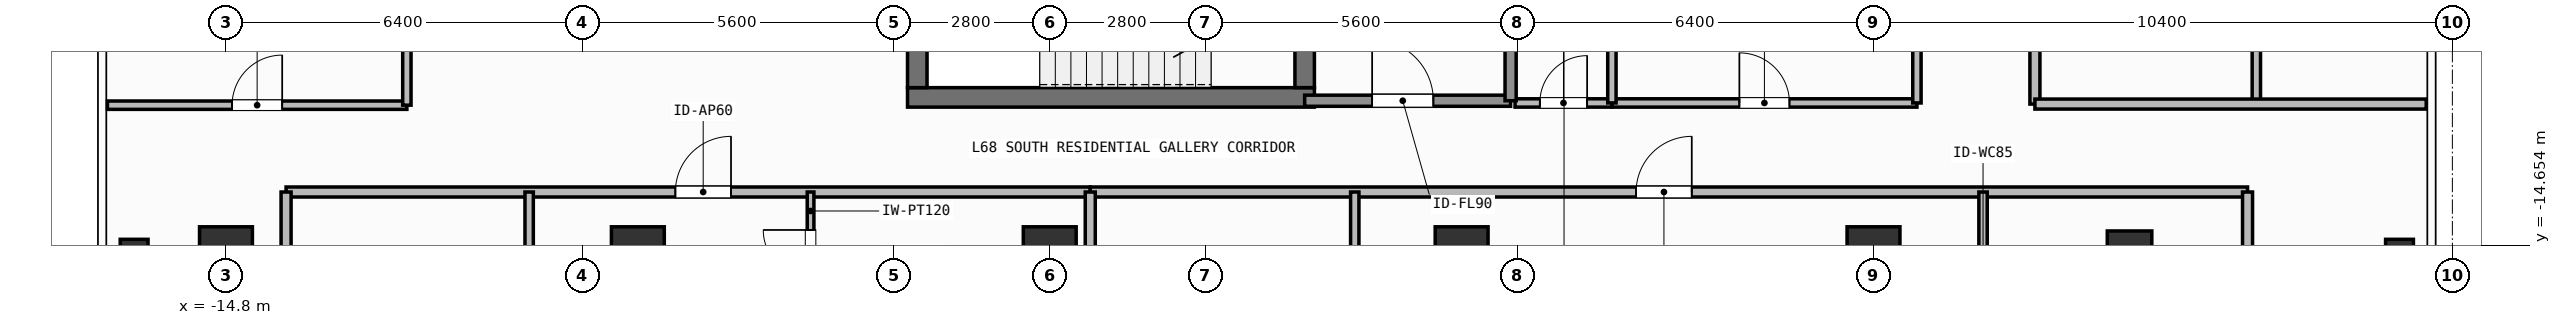
"""IFC4 building model, lengths in metres.
Left out: names, types, materials, properties, quantities, classifications, styles, units other than length and angle.
Written with IfcOpenShell. Run it as: python <this file> out.ifc"""

import sys

from ifc_helpers import new_model, si_unit, direction, frame, frame_2d, origin, origin_2d, place, context, subcontext, project, spatial, rectangle, hollow_rectangle, extrude, element, fill, save


model = new_model("IFC4")
c1 = context("Model", 3, precision=1e-05, world=origin(), true_north=direction((0.0, 1.0)))
c2 = subcontext(c1, "Body", "Model", "MODEL_VIEW")
j1 = project(units=[si_unit("LENGTHUNIT", "METRE"), si_unit("PLANEANGLEUNIT", "RADIAN")], contexts=[c1])
p1 = place(None, origin())
s1 = spatial("IfcSite", under=j1, at=p1, CompositionType="ELEMENT")
p2 = place(p1, origin())
s2 = spatial("IfcBuilding", under=s1, at=p2, CompositionType="ELEMENT")
p3 = place(p2, frame((0.0, 0.0, 278.1)))
s3 = spatial("IfcBuildingStorey", under=s2, at=p3, CompositionType="ELEMENT", Elevation=278.1)
p4 = place(p3, frame((-2.555, -12.0, 0.0), z_axis=(0.0, 0.0, 1.0), x_axis=(1.0, 0.0, 0.0)))
e1 = element("IfcWall", 1, at=p4, inside=s3, PredefinedType="SHEAR", context=c2, shape_type="SweptSolid", body=[
    extrude(rectangle(XDim=7.31, YDim=0.35, at=frame_2d((3.655, 0.0))), origin(), (0.0, 0.0, 1.0), 3.9),
])
p5 = place(p3, frame((-2.38, -11.825, 0.0), z_axis=(0.0, 0.0, 1.0), x_axis=(0.0, 1.0, 0.0)))
e2 = element("IfcWall", 2, at=p5, inside=s3, PredefinedType="SHEAR", context=c2, shape_type="SweptSolid", body=[
    extrude(rectangle(XDim=2.925, YDim=0.35, at=frame_2d((1.462, 0.0))), origin(), (0.0, 0.0, 1.0), 3.9),
])
p6 = place(p3, frame((4.58, -8.9, 0.0), z_axis=(0.0, 0.0, 1.0), x_axis=(0.0, -1.0, 0.0)))
e3 = element("IfcWall", 3, at=p6, inside=s3, PredefinedType="SHEAR", context=c2, shape_type="SweptSolid", body=[
    extrude(rectangle(XDim=2.925, YDim=0.35, at=frame_2d((1.462, 0.0))), origin(), (0.0, 0.0, 1.0), 3.9),
])
p7 = place(p6, frame((0.913, 0.0, 0.0)))
e4 = element("IfcOpeningElement", 4, at=p7, cuts=e3, PredefinedType="OPENING", context=c2, shape_type="SweptSolid", body=[
    extrude(rectangle(XDim=1.1, YDim=2.15, at=frame_2d((0.55, 1.075))), frame((0.0, 0.185, 0.0), z_axis=(0.0, -1.0, 0.0), x_axis=(1.0, 0.0, 0.0)), (0.0, 0.0, 1.0), 0.37),
])
for number, where, z_axis, x_axis in (
    (5, (-14.8, -14.8, 0.0), (0.0, 0.0, 1.0), (1.0, 0.0, 0.0)),
    (6, (-7.4, -14.8, 0.0), (0.0, 0.0, 1.0), (1.0, 0.0, 0.0)),
    (7, (0.0, -14.8, 0.0), (0.0, 0.0, 1.0), (1.0, 0.0, 0.0)),
    (8, (7.4, -14.8, 0.0), (0.0, 0.0, 1.0), (1.0, 0.0, 0.0)),
    (9, (14.8, -14.8, 0.0), (0.0, 0.0, 1.0), (1.0, 0.0, 0.0)),
):
    element("IfcColumn", number, at=place(p3, frame(where, z_axis=z_axis, x_axis=x_axis)), inside=s3, PredefinedType="COLUMN", context=c2, shape_type="SweptSolid", body=[
        extrude(rectangle(XDim=0.95, YDim=0.95, at=origin_2d()), origin(), (0.0, 0.0, 1.0), 3.9),
    ])
p8 = place(p3, frame((19.4, -14.8, 0.0), z_axis=(0.0, 0.0, 1.0), x_axis=(1.0, 0.0, 0.0)))
e10 = element("IfcColumn", 10, at=p8, inside=s3, PredefinedType="COLUMN", context=c2, shape_type="SweptSolid", body=[
    extrude(hollow_rectangle(XDim=0.8, YDim=0.8, WallThickness=0.036, at=origin_2d()), origin(), (0.0, 0.0, 1.0), 3.9),
])
for number, where, z_axis, x_axis in (
    (11, (-16.45, -14.8, 0.0), (0.0, 0.0, 1.0), (1.0, 0.0, 0.0)),
    (12, (24.25, -14.8, 0.0), (0.0, 0.0, 1.0), (1.0, 0.0, 0.0)),
):
    element("IfcColumn", number, at=place(p3, frame(where, z_axis=z_axis, x_axis=x_axis)), inside=s3, PredefinedType="COLUMN", context=c2, shape_type="SweptSolid", body=[
        extrude(hollow_rectangle(XDim=0.5, YDim=0.5, WallThickness=0.025, at=origin_2d()), origin(), (0.0, 0.0, 1.0), 3.9),
    ])
p9 = place(p3, frame((4.58, -12.06, 0.0), z_axis=(0.0, 0.0, 1.0), x_axis=(1.0, 0.0, 0.0)))
e13 = element("IfcWall", 13, at=p9, inside=s3, PredefinedType="SOLIDWALL", context=c2, shape_type="SweptSolid", body=[
    extrude(rectangle(XDim=3.7, YDim=0.2, at=frame_2d((1.85, 0.0))), origin(), (0.0, 0.0, 1.0), 3.68),
])
p10 = place(p9, frame((1.212, 0.0, 0.0)))
e14 = element("IfcOpeningElement", 14, at=p10, cuts=e13, PredefinedType="OPENING", context=c2, shape_type="SweptSolid", body=[
    extrude(rectangle(XDim=1.1, YDim=2.15, at=frame_2d((0.55, 1.075))), frame((0.0, 0.11, 0.0), z_axis=(0.0, -1.0, 0.0), x_axis=(1.0, 0.0, 0.0)), (0.0, 0.0, 1.0), 0.22),
])
p11 = place(p3, frame((8.36, -12.1, 0.0), z_axis=(0.0, 0.0, 1.0), x_axis=(1.0, 0.0, 0.0)))
e15 = element("IfcWall", 15, at=p11, inside=s3, PredefinedType="PARTITIONING", context=c2, shape_type="SweptSolid", body=[
    extrude(rectangle(XDim=1.74, YDim=0.15, at=frame_2d((0.87, 0.0))), origin(), (0.0, 0.0, 1.0), 3.68),
])
p12 = place(p11, frame((0.445, 0.0, 0.0)))
e16 = element("IfcOpeningElement", 16, at=p12, cuts=e15, PredefinedType="OPENING", context=c2, shape_type="SweptSolid", body=[
    extrude(rectangle(XDim=0.85, YDim=2.1, at=frame_2d((0.425, 1.05))), frame((0.0, 0.085, 0.0), z_axis=(0.0, -1.0, 0.0), x_axis=(1.0, 0.0, 0.0)), (0.0, 0.0, 1.0), 0.17),
])
p13 = place(p3, frame((10.1, -12.1, 0.0), z_axis=(0.0, 0.0, 1.0), x_axis=(1.0, 0.0, 0.0)))
e17 = element("IfcWall", 17, at=p13, inside=s3, PredefinedType="PARTITIONING", context=c2, shape_type="SweptSolid", body=[
    extrude(rectangle(XDim=5.48, YDim=0.15, at=frame_2d((2.74, 0.0))), origin(), (0.0, 0.0, 1.0), 3.68),
])
p14 = place(p13, frame((2.29, 0.0, 0.0)))
e18 = element("IfcOpeningElement", 18, at=p14, cuts=e17, PredefinedType="OPENING", context=c2, shape_type="SweptSolid", body=[
    extrude(rectangle(XDim=0.9, YDim=2.1, at=frame_2d((0.45, 1.05))), frame((0.0, 0.085, 0.0), z_axis=(0.0, -1.0, 0.0), x_axis=(1.0, 0.0, 0.0)), (0.0, 0.0, 1.0), 0.17),
])
p15 = place(p3, frame((-13.72, -13.7, 0.0), z_axis=(0.0, 0.0, 1.0), x_axis=(1.0, 0.0, 0.0)))
e19 = element("IfcWall", 19, at=p15, inside=s3, PredefinedType="PARTITIONING", context=c2, shape_type="SweptSolid", body=[
    extrude(rectangle(XDim=14.448, YDim=0.18, at=frame_2d((7.224, 0.0))), origin(), (0.0, 0.0, 1.0), 3.68),
])
p16 = place(p15, frame((6.994, 0.0, 0.0)))
e20 = element("IfcOpeningElement", 20, at=p16, cuts=e19, PredefinedType="OPENING", context=c2, shape_type="SweptSolid", body=[
    extrude(rectangle(XDim=1.0, YDim=2.2, at=frame_2d((0.5, 1.1))), frame((0.0, 0.1, 0.0), z_axis=(0.0, -1.0, 0.0), x_axis=(1.0, 0.0, 0.0)), (0.0, 0.0, 1.0), 0.2),
])
p17 = place(p3, frame((-9.353, -17.343, 0.0), z_axis=(0.0, 0.0, 1.0), x_axis=(0.0, 1.0, 0.0)))
e21 = element("IfcWall", 21, at=p17, inside=s3, PredefinedType="PARTITIONING", context=c2, shape_type="SweptSolid", body=[
    extrude(rectangle(XDim=3.643, YDim=0.15, at=frame_2d((1.822, 0.0))), origin(), (0.0, 0.0, 1.0), 3.68),
])
p18 = place(p17, frame((1.396, 0.0, 0.0)))
e22 = element("IfcOpeningElement", 22, at=p18, cuts=e21, PredefinedType="OPENING", context=c2, shape_type="SweptSolid", body=[
    extrude(rectangle(XDim=0.85, YDim=2.1, at=frame_2d((0.425, 1.05))), frame((0.0, 0.085, 0.0), z_axis=(0.0, -1.0, 0.0), x_axis=(1.0, 0.0, 0.0)), (0.0, 0.0, 1.0), 0.17),
])
p19 = place(p3, frame((-4.297, -15.74, 0.0), z_axis=(0.0, 0.0, 1.0), x_axis=(0.0, 1.0, 0.0)))
e23 = element("IfcWall", 23, at=p19, inside=s3, PredefinedType="PARTITIONING", context=c2, shape_type="SweptSolid", body=[
    extrude(rectangle(XDim=2.04, YDim=0.12, at=frame_2d((1.02, 0.0))), origin(), (0.0, 0.0, 1.0), 3.68),
])
p20 = place(p19, frame((0.508, 0.0, 0.0)))
e24 = element("IfcOpeningElement", 24, at=p20, cuts=e23, PredefinedType="OPENING", context=c2, shape_type="SweptSolid", body=[
    extrude(rectangle(XDim=0.85, YDim=2.1, at=frame_2d((0.425, 1.05))), frame((0.0, 0.07, 0.0), z_axis=(0.0, -1.0, 0.0), x_axis=(1.0, 0.0, 0.0)), (0.0, 0.0, 1.0), 0.14),
])
p21 = place(p3, frame((0.728, -13.7, 0.0), z_axis=(0.0, 0.0, 1.0), x_axis=(1.0, 0.0, 0.0)))
e25 = element("IfcWall", 25, at=p21, inside=s3, PredefinedType="PARTITIONING", context=c2, shape_type="SweptSolid", body=[
    extrude(rectangle(XDim=20.792, YDim=0.18, at=frame_2d((10.396, 0.0))), origin(), (0.0, 0.0, 1.0), 3.68),
])
p22 = place(p21, frame((9.807, 0.0, 0.0)))
e26 = element("IfcOpeningElement", 26, at=p22, cuts=e25, PredefinedType="OPENING", context=c2, shape_type="SweptSolid", body=[
    extrude(rectangle(XDim=1.0, YDim=2.2, at=frame_2d((0.5, 1.1))), frame((0.0, 0.1, 0.0), z_axis=(0.0, -1.0, 0.0), x_axis=(1.0, 0.0, 0.0)), (0.0, 0.0, 1.0), 0.2),
])
p23 = place(p3, frame((5.48, -17.045, 0.0), z_axis=(0.0, 0.0, 1.0), x_axis=(0.0, 1.0, 0.0)))
e27 = element("IfcWall", 27, at=p23, inside=s3, PredefinedType="PARTITIONING", context=c2, shape_type="SweptSolid", body=[
    extrude(rectangle(XDim=3.345, YDim=0.15, at=frame_2d((1.672, 0.0))), origin(), (0.0, 0.0, 1.0), 3.68),
])
p24 = place(p23, frame((1.164, 0.0, 0.0)))
e28 = element("IfcOpeningElement", 28, at=p24, cuts=e27, PredefinedType="OPENING", context=c2, shape_type="SweptSolid", body=[
    extrude(rectangle(XDim=0.85, YDim=2.1, at=frame_2d((0.425, 1.05))), frame((0.0, 0.085, 0.0), z_axis=(0.0, -1.0, 0.0), x_axis=(1.0, 0.0, 0.0)), (0.0, 0.0, 1.0), 0.17),
])
p25 = place(p3, frame((16.768, -17.045, 0.0), z_axis=(0.0, 0.0, 1.0), x_axis=(0.0, 1.0, 0.0)))
e29 = element("IfcWall", 29, at=p25, inside=s3, PredefinedType="PARTITIONING", context=c2, shape_type="SweptSolid", body=[
    extrude(rectangle(XDim=3.345, YDim=0.15, at=frame_2d((1.672, 0.0))), origin(), (0.0, 0.0, 1.0), 3.68),
])
p26 = place(p25, frame((1.164, 0.0, 0.0)))
e30 = element("IfcOpeningElement", 30, at=p26, cuts=e29, PredefinedType="OPENING", context=c2, shape_type="SweptSolid", body=[
    extrude(rectangle(XDim=0.85, YDim=2.1, at=frame_2d((0.425, 1.05))), frame((0.0, 0.085, 0.0), z_axis=(0.0, -1.0, 0.0), x_axis=(1.0, 0.0, 0.0)), (0.0, 0.0, 1.0), 0.17),
])
p27 = place(p3, frame((-16.93, -12.14, 0.0), z_axis=(0.0, 0.0, 1.0), x_axis=(1.0, 0.0, 0.0)))
e31 = element("IfcWall", 31, at=p27, inside=s3, PredefinedType="PARTITIONING", context=c2, shape_type="SweptSolid", body=[
    extrude(rectangle(XDim=5.38, YDim=0.15, at=frame_2d((2.69, 0.0))), origin(), (0.0, 0.0, 1.0), 3.68),
])
p28 = place(p27, frame((2.24, 0.0, 0.0)))
e32 = element("IfcOpeningElement", 32, at=p28, cuts=e31, PredefinedType="OPENING", context=c2, shape_type="SweptSolid", body=[
    extrude(rectangle(XDim=0.9, YDim=2.1, at=frame_2d((0.45, 1.05))), frame((0.0, 0.085, 0.0), z_axis=(0.0, -1.0, 0.0), x_axis=(1.0, 0.0, 0.0)), (0.0, 0.0, 1.0), 0.17),
])
p29 = place(p3, frame((17.7, -12.12, 0.0), z_axis=(0.0, 0.0, 1.0), x_axis=(0.0, 1.0, 0.0)))
e33 = element("IfcWall", 33, at=p29, inside=s3, PredefinedType="PARTITIONING", context=c2, shape_type="SweptSolid", body=[
    extrude(rectangle(XDim=24.24, YDim=0.18, at=frame_2d((12.12, 0.0))), origin(), (0.0, 0.0, 1.0), 3.68),
])
p30 = place(p29, frame((11.62, 0.0, 0.0)))
e34 = element("IfcOpeningElement", 34, at=p30, cuts=e33, PredefinedType="OPENING", context=c2, shape_type="SweptSolid", body=[
    extrude(rectangle(XDim=1.0, YDim=2.2, at=frame_2d((0.5, 1.1))), frame((0.0, 0.1, 0.0), z_axis=(0.0, -1.0, 0.0), x_axis=(1.0, 0.0, 0.0)), (0.0, 0.0, 1.0), 0.2),
])
p31 = place(p3, frame((8.28, -12.06, 0.0), z_axis=(0.0, 0.0, 1.0), x_axis=(0.0, 1.0, 0.0)))
e35 = element("IfcWall", 35, at=p31, inside=s3, PredefinedType="SOLIDWALL", context=c2, shape_type="SweptSolid", body=[
    extrude(rectangle(XDim=3.335, YDim=0.2, at=frame_2d((1.667, 0.0))), origin(), (0.0, 0.0, 1.0), 3.68),
])
p32 = place(p3, frame((10.1, -12.1, 0.0), z_axis=(0.0, 0.0, 1.0), x_axis=(0.0, 1.0, 0.0)))
e36 = element("IfcWall", 36, at=p32, inside=s3, PredefinedType="PARTITIONING", context=c2, shape_type="SweptSolid", body=[
    extrude(rectangle(XDim=2.35, YDim=0.15, at=frame_2d((1.175, 0.0))), origin(), (0.0, 0.0, 1.0), 3.68),
])
p33 = place(p3, frame((15.58, -12.1, 0.0), z_axis=(0.0, 0.0, 1.0), x_axis=(0.0, 1.0, 0.0)))
e37 = element("IfcWall", 37, at=p33, inside=s3, PredefinedType="PARTITIONING", context=c2, shape_type="SweptSolid", body=[
    extrude(rectangle(XDim=6.25, YDim=0.15, at=frame_2d((3.125, 0.0))), origin(), (0.0, 0.0, 1.0), 3.68),
])
for number, where, z_axis, x_axis in (
    (38, (-13.72, -19.51, 0.0), (0.0, 0.0, 1.0), (0.0, 1.0, 0.0)),
    (39, (21.52, -19.51, 0.0), (0.0, 0.0, 1.0), (0.0, 1.0, 0.0)),
):
    element("IfcWall", number, at=place(p3, frame(where, z_axis=z_axis, x_axis=x_axis)), inside=s3, PredefinedType="PARTITIONING", context=c2, shape_type="SweptSolid", body=[
        extrude(rectangle(XDim=5.81, YDim=0.18, at=frame_2d((2.905, 0.0))), origin(), (0.0, 0.0, 1.0), 3.68),
    ])
p34 = place(p3, frame((0.728, -20.63, 0.0), z_axis=(0.0, 0.0, 1.0), x_axis=(0.0, 1.0, 0.0)))
e40 = element("IfcWall", 40, at=p34, inside=s3, PredefinedType="PARTITIONING", context=c2, shape_type="SweptSolid", body=[
    extrude(rectangle(XDim=6.93, YDim=0.18, at=frame_2d((3.465, 0.0))), origin(), (0.0, 0.0, 1.0), 3.68),
])
p35 = place(p3, frame((-11.55, -12.14, 0.0), z_axis=(0.0, 0.0, 1.0), x_axis=(0.0, 1.0, 0.0)))
e41 = element("IfcWall", 41, at=p35, inside=s3, PredefinedType="PARTITIONING", context=c2, shape_type="SweptSolid", body=[
    extrude(rectangle(XDim=13.94, YDim=0.15, at=frame_2d((6.97, 0.0))), origin(), (0.0, 0.0, 1.0), 3.68),
])
p36 = place(p3, frame((21.678, -12.12, 0.0), z_axis=(0.0, 0.0, 1.0), x_axis=(0.0, 1.0, 0.0)))
e42 = element("IfcWall", 42, at=p36, inside=s3, PredefinedType="PARTITIONING", context=c2, shape_type="SweptSolid", body=[
    extrude(rectangle(XDim=6.689, YDim=0.15, at=frame_2d((3.345, 0.0))), origin(), (0.0, 0.0, 1.0), 3.68),
])
p37 = place(p3, frame((17.7, -12.12, 0.0), z_axis=(0.0, 0.0, 1.0), x_axis=(1.0, 0.0, 0.0)))
e43 = element("IfcWall", 43, at=p37, inside=s3, PredefinedType="PARTITIONING", context=c2, shape_type="SweptSolid", body=[
    extrude(rectangle(XDim=7.03, YDim=0.18, at=frame_2d((3.515, 0.0))), origin(), (0.0, 0.0, 1.0), 3.68),
])
p38 = place(p10, origin())
e44 = element("IfcDoor", 44, at=p38, inside=s3, OperationType="SINGLE_SWING_LEFT", PredefinedType="DOOR", context=c2, shape_type="SweptSolid", body=[
    extrude(rectangle(XDim=1.1, YDim=2.15, at=frame_2d((0.55, 1.075))), frame((0.0, 0.025, 0.0), z_axis=(0.0, -1.0, 0.0), x_axis=(1.0, 0.0, 0.0)), (0.0, 0.0, 1.0), 0.05),
])
fill(e14, e44)
p39 = place(p12, origin())
e45 = element("IfcDoor", 45, at=p39, inside=s3, OperationType="SINGLE_SWING_RIGHT", PredefinedType="DOOR", context=c2, shape_type="SweptSolid", body=[
    extrude(rectangle(XDim=0.85, YDim=2.1, at=frame_2d((0.425, 1.05))), frame((0.0, 0.025, 0.0), z_axis=(0.0, -1.0, 0.0), x_axis=(1.0, 0.0, 0.0)), (0.0, 0.0, 1.0), 0.05),
])
fill(e16, e45)
p40 = place(p14, origin())
e46 = element("IfcDoor", 46, at=p40, inside=s3, OperationType="SINGLE_SWING_LEFT", PredefinedType="DOOR", context=c2, shape_type="SweptSolid", body=[
    extrude(rectangle(XDim=0.9, YDim=2.1, at=frame_2d((0.45, 1.05))), frame((0.0, 0.025, 0.0), z_axis=(0.0, -1.0, 0.0), x_axis=(1.0, 0.0, 0.0)), (0.0, 0.0, 1.0), 0.05),
])
fill(e18, e46)
p41 = place(p16, origin())
e47 = element("IfcDoor", 47, at=p41, inside=s3, OperationType="SINGLE_SWING_RIGHT", PredefinedType="DOOR", context=c2, shape_type="SweptSolid", body=[
    extrude(rectangle(XDim=1.0, YDim=2.2, at=frame_2d((0.5, 1.1))), frame((0.0, 0.025, 0.0), z_axis=(0.0, -1.0, 0.0), x_axis=(1.0, 0.0, 0.0)), (0.0, 0.0, 1.0), 0.05),
])
fill(e20, e47)
p42 = place(p20, origin())
e48 = element("IfcDoor", 48, at=p42, inside=s3, OperationType="SINGLE_SWING_RIGHT", PredefinedType="DOOR", context=c2, shape_type="SweptSolid", body=[
    extrude(rectangle(XDim=0.85, YDim=2.1, at=frame_2d((0.425, 1.05))), frame((0.0, 0.025, 0.0), z_axis=(0.0, -1.0, 0.0), x_axis=(1.0, 0.0, 0.0)), (0.0, 0.0, 1.0), 0.05),
])
fill(e24, e48)
p43 = place(p22, origin())
e49 = element("IfcDoor", 49, at=p43, inside=s3, OperationType="SINGLE_SWING_RIGHT", PredefinedType="DOOR", context=c2, shape_type="SweptSolid", body=[
    extrude(rectangle(XDim=1.0, YDim=2.2, at=frame_2d((0.5, 1.1))), frame((0.0, 0.025, 0.0), z_axis=(0.0, -1.0, 0.0), x_axis=(1.0, 0.0, 0.0)), (0.0, 0.0, 1.0), 0.05),
])
fill(e26, e49)
p44 = place(p28, origin())
e50 = element("IfcDoor", 50, at=p44, inside=s3, OperationType="SINGLE_SWING_RIGHT", PredefinedType="DOOR", context=c2, shape_type="SweptSolid", body=[
    extrude(rectangle(XDim=0.9, YDim=2.1, at=frame_2d((0.45, 1.05))), frame((0.0, 0.025, 0.0), z_axis=(0.0, -1.0, 0.0), x_axis=(1.0, 0.0, 0.0)), (0.0, 0.0, 1.0), 0.05),
])
fill(e32, e50)
save(model, sys.argv[1])
